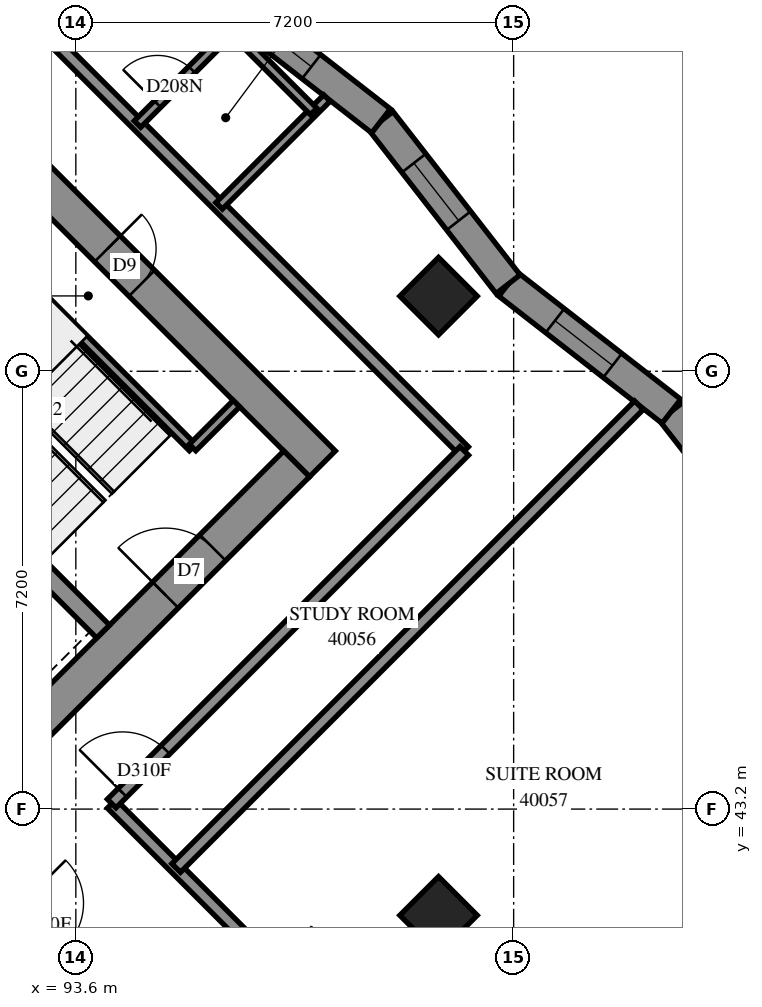
"""IFC4 building model, lengths in metres.
Left out: names, types, materials, properties, quantities, classifications, styles, units other than length and angle.
Written with IfcOpenShell. Run it as: python <this file> out.ifc"""

import sys

from ifc_helpers import new_model, si_unit, direction, frame, frame_2d, origin, origin_2d, place, context, subcontext, project, spatial, polyline, rectangle, outline, extrude, element, fill, save


model = new_model("IFC4")
c1 = context("Model", 3, precision=1e-05, world=origin(), true_north=direction((0.0, 1.0)))
c2 = subcontext(c1, "Body", "Model", "MODEL_VIEW")
j1 = project(units=[si_unit("LENGTHUNIT", "METRE"), si_unit("PLANEANGLEUNIT", "RADIAN")], contexts=[c1])
p1 = place(None, origin())
s1 = spatial("IfcSite", under=j1, at=p1, CompositionType="ELEMENT")
p2 = place(p1, origin())
s2 = spatial("IfcBuilding", under=s1, at=p2, CompositionType="ELEMENT")
p3 = place(p2, frame((0.0, 0.0, 149.0)))
s3 = spatial("IfcBuildingStorey", under=s2, at=p3, CompositionType="ELEMENT", Elevation=149.0)
for number, where, z_axis, x_axis in (
    (1, (99.565, 51.635, 0.0), (0.0, 0.0, 1.0), (0.707, -0.707, 0.0)),
    (2, (99.565, 41.453, 0.0), (0.0, 0.0, 1.0), (0.707, -0.707, 0.0)),
):
    element("IfcColumn", number, at=place(p3, frame(where, z_axis=z_axis, x_axis=x_axis)), inside=s3, PredefinedType="COLUMN", context=c2, shape_type="SweptSolid", body=[
        extrude(rectangle(XDim=0.9, YDim=0.9, at=origin_2d()), origin(), (0.0, 0.0, 1.0), 3.1),
    ])
p4 = place(p3, frame((86.625, 59.908, -0.3), z_axis=(0.0, 0.0, 1.0), x_axis=(0.7071067812, -0.7071067812, 0.0)))
e3 = element("IfcWall", 3, at=p4, inside=s3, PredefinedType="SHEAR", context=c2, shape_type="SweptSolid", body=[
    extrude(rectangle(XDim=15.6, YDim=0.6, at=frame_2d((7.8, 0.0))), origin(), (0.0, 0.0, 1.0), 2.7),
])
p5 = place(p4, frame((10.6, 0.0, 0.3)))
e4 = element("IfcOpeningElement", 4, at=p5, cuts=e3, PredefinedType="OPENING", context=c2, shape_type="SweptSolid", body=[
    extrude(rectangle(XDim=0.8, YDim=2.1, at=frame_2d((0.4, 1.05))), frame((0.0, 0.31, 0.0), z_axis=(0.0, -1.0, 0.0), x_axis=(1.0, 0.0, 0.0)), (0.0, 0.0, 1.0), 0.62),
])
p6 = place(p3, frame((87.049, 38.695, -0.3), z_axis=(0.0, 0.0, 1.0), x_axis=(0.7071067812, 0.7071067812, 0.0)))
e5 = element("IfcWall", 5, at=p6, inside=s3, PredefinedType="SHEAR", context=c2, shape_type="SweptSolid", body=[
    extrude(rectangle(XDim=14.4, YDim=0.6, at=frame_2d((7.2, 0.0))), origin(), (0.0, 0.0, 1.0), 2.7),
])
p7 = place(p6, frame((4.55, 0.0, 0.3)))
e6 = element("IfcOpeningElement", 6, at=p7, cuts=e5, PredefinedType="OPENING", context=c2, shape_type="SweptSolid", body=[
    extrude(rectangle(XDim=1.1, YDim=2.1, at=frame_2d((0.55, 1.05))), frame((0.0, 0.31, 0.0), z_axis=(0.0, -1.0, 0.0), x_axis=(1.0, 0.0, 0.0)), (0.0, 0.0, 1.0), 0.62),
])
p8 = place(p6, frame((11.35, 0.0, 0.3)))
e7 = element("IfcOpeningElement", 7, at=p8, cuts=e5, PredefinedType="OPENING", context=c2, shape_type="SweptSolid", body=[
    extrude(rectangle(XDim=1.1, YDim=2.1, at=frame_2d((0.55, 1.05))), frame((0.0, 0.31, 0.0), z_axis=(0.0, -1.0, 0.0), x_axis=(1.0, 0.0, 0.0)), (0.0, 0.0, 1.0), 0.62),
])
p9 = place(p3, frame((88.958, 51.211, 0.0), z_axis=(0.0, 0.0, 1.0), x_axis=(0.7070998367, -0.7071137256, 0.0)))
e8 = element("IfcWall", 8, at=p9, inside=s3, PredefinedType="SOLIDWALL", context=c2, shape_type="SweptSolid", body=[
    extrude(rectangle(XDim=7.2, YDim=0.3, at=frame_2d((3.6, 0.0))), origin(), (0.0, 0.0, 1.0), 3.1),
])
p10 = place(p3, frame((105.498, 47.039, 0.0), z_axis=(0.0, 0.0, 1.0), x_axis=(-0.6141912527, 0.7891572119, 0.0)))
e9 = element("IfcWall", 9, at=p10, inside=s3, PredefinedType="SOLIDWALL", context=c2, shape_type="SweptSolid", body=[
    extrude(outline(polyline([(0.053, -0.25), (3.456, -0.25), (3.393, 0.25), (-0.053, 0.25), (0.053, -0.25)])), origin(), (0.0, 0.0, 1.0), 3.1),
])
p11 = place(p10, frame((1.097, 0.0, 0.45)))
e10 = element("IfcOpeningElement", 10, at=p11, cuts=e9, PredefinedType="OPENING", context=c2, shape_type="SweptSolid", body=[
    extrude(rectangle(XDim=1.2, YDim=2.5, at=frame_2d((0.6, 1.25))), frame((0.0, 0.26, 0.0), z_axis=(0.0, -1.0, 0.0), x_axis=(1.0, 0.0, 0.0)), (0.0, 0.0, 1.0), 0.52),
])
p12 = place(p3, frame((103.394, 49.742, 0.0), z_axis=(0.0, 0.0, 1.0), x_axis=(-0.7891622864, 0.6141847326, 0.0)))
e11 = element("IfcWall", 11, at=p12, inside=s3, PredefinedType="SOLIDWALL", context=c2, shape_type="SweptSolid", body=[
    extrude(outline(polyline([(-0.031, -0.25), (3.372, -0.25), (3.434, 0.25), (0.031, 0.25), (-0.031, -0.25)])), origin(), (0.0, 0.0, 1.0), 3.1),
])
p13 = place(p12, frame((1.226, 0.0, 0.45)))
e12 = element("IfcOpeningElement", 12, at=p13, cuts=e11, PredefinedType="OPENING", context=c2, shape_type="SweptSolid", body=[
    extrude(rectangle(XDim=1.2, YDim=2.5, at=frame_2d((0.6, 1.25))), frame((0.0, 0.26, 0.0), z_axis=(0.0, -1.0, 0.0), x_axis=(1.0, 0.0, 0.0)), (0.0, 0.0, 1.0), 0.52),
])
p14 = place(p3, frame((100.709, 51.832, 0.0), z_axis=(0.0, 0.0, 1.0), x_axis=(-0.6141887905, 0.7891591282, 0.0)))
e13 = element("IfcWall", 13, at=p14, inside=s3, PredefinedType="SOLIDWALL", context=c2, shape_type="SweptSolid", body=[
    extrude(outline(polyline([(0.031, -0.25), (3.434, -0.25), (3.372, 0.25), (-0.031, 0.25), (0.031, -0.25)])), origin(), (0.0, 0.0, 1.0), 3.1),
])
p15 = place(p14, frame((1.323, 0.0, 0.45)))
e14 = element("IfcOpeningElement", 14, at=p15, cuts=e13, PredefinedType="OPENING", context=c2, shape_type="SweptSolid", body=[
    extrude(rectangle(XDim=1.2, YDim=2.5, at=frame_2d((0.6, 1.25))), frame((0.0, 0.26, 0.0), z_axis=(0.0, -1.0, 0.0), x_axis=(1.0, 0.0, 0.0)), (0.0, 0.0, 1.0), 0.52),
])
p16 = place(p3, frame((98.619, 54.517, 0.0), z_axis=(0.0, 0.0, 1.0), x_axis=(-0.7891480422, 0.6142030344, 0.0)))
e15 = element("IfcWall", 15, at=p16, inside=s3, PredefinedType="SOLIDWALL", context=c2, shape_type="SweptSolid", body=[
    extrude(outline(polyline([(-0.031, -0.25), (3.372, -0.25), (3.434, 0.25), (0.031, 0.25), (-0.031, -0.25)])), origin(), (0.0, 0.0, 1.0), 3.1),
])
p17 = place(p16, frame((1.452, 0.0, 0.45)))
e16 = element("IfcOpeningElement", 16, at=p17, cuts=e15, PredefinedType="OPENING", context=c2, shape_type="SweptSolid", body=[
    extrude(rectangle(XDim=1.2, YDim=2.5, at=frame_2d((0.6, 1.25))), frame((0.0, 0.26, 0.0), z_axis=(0.0, -1.0, 0.0), x_axis=(1.0, 0.0, 0.0)), (0.0, 0.0, 1.0), 0.52),
])
p18 = place(p3, frame((91.313, 53.354, 0.0), z_axis=(0.0, 0.0, 1.0), x_axis=(0.7071067812, -0.7071067812, 0.0)))
e17 = element("IfcWall", 17, at=p18, inside=s3, PredefinedType="PARTITIONING", context=c2, shape_type="SweptSolid", body=[
    extrude(rectangle(XDim=5.95, YDim=0.15, at=frame_2d((2.975, 0.0))), origin(), (0.0, 0.0, 1.0), 3.1),
])
p19 = place(p3, frame((95.52, 49.146, 0.0), z_axis=(0.0, 0.0, 1.0), x_axis=(0.7071067812, 0.7071067812, 0.0)))
e18 = element("IfcWall", 18, at=p19, inside=s3, PredefinedType="PARTITIONING", context=c2, shape_type="SweptSolid", body=[
    extrude(rectangle(XDim=1.02, YDim=0.15, at=frame_2d((0.51, 0.0))), origin(), (0.0, 0.0, 1.0), 3.1),
])
p20 = place(p3, frame((94.189, 43.287, 0.0), z_axis=(0.0, 0.0, 1.0), x_axis=(0.7071067812, -0.7071067812, 0.0)))
e19 = element("IfcWall", 19, at=p20, inside=s3, PredefinedType="PARTITIONING", context=c2, shape_type="SweptSolid", body=[
    extrude(rectangle(XDim=12.298, YDim=0.2, at=frame_2d((6.149, 0.0))), origin(), (0.0, 0.0, 1.0), 3.1),
])
p21 = place(p20, frame((3.755, 0.0, 0.0)))
e20 = element("IfcOpeningElement", 20, at=p21, cuts=e19, PredefinedType="OPENING", context=c2, shape_type="SweptSolid", body=[
    extrude(rectangle(XDim=0.9, YDim=2.1, at=frame_2d((0.45, 1.05))), frame((0.0, 0.11, 0.0), z_axis=(0.0, -1.0, 0.0), x_axis=(1.0, 0.0, 0.0)), (0.0, 0.0, 1.0), 0.22),
])
p22 = place(p20, frame((10.998, 0.0, 0.0)))
e21 = element("IfcOpeningElement", 21, at=p22, cuts=e19, PredefinedType="OPENING", context=c2, shape_type="SweptSolid", body=[
    extrude(rectangle(XDim=0.9, YDim=2.1, at=frame_2d((0.45, 1.05))), frame((0.0, 0.11, 0.0), z_axis=(0.0, -1.0, 0.0), x_axis=(1.0, 0.0, 0.0)), (0.0, 0.0, 1.0), 0.22),
])
p23 = place(p3, frame((91.755, 57.317, 0.0), z_axis=(0.0, 0.0, 1.0), x_axis=(0.7071067812, -0.7071067812, 0.0)))
e22 = element("IfcWall", 22, at=p23, inside=s3, PredefinedType="PARTITIONING", context=c2, shape_type="SweptSolid", body=[
    extrude(rectangle(XDim=11.639, YDim=0.2, at=frame_2d((5.819, 0.0))), origin(), (0.0, 0.0, 1.0), 3.1),
])
p24 = place(p3, frame((95.25, 42.232, 0.0), z_axis=(0.0, 0.0, 1.0), x_axis=(0.7071114274, 0.7071021349, 0.0)))
e23 = element("IfcWall", 23, at=p24, inside=s3, PredefinedType="PARTITIONING", context=c2, shape_type="SweptSolid", body=[
    extrude(rectangle(XDim=10.761, YDim=0.2, at=frame_2d((5.381, 0.0))), origin(), (0.0, 0.0, 1.0), 3.1),
])
p25 = place(p3, frame((94.19, 43.292, 0.0), z_axis=(0.0, 0.0, 1.0), x_axis=(0.7071067812, 0.7071067812, 0.0)))
e24 = element("IfcWall", 24, at=p25, inside=s3, PredefinedType="PARTITIONING", context=c2, shape_type="SweptSolid", body=[
    extrude(rectangle(XDim=8.2, YDim=0.2, at=frame_2d((4.1, 0.0))), origin(), (0.0, 0.0, 1.0), 3.1),
])
p26 = place(p25, frame((0.251, 0.0, 0.0)))
e25 = element("IfcOpeningElement", 25, at=p26, cuts=e24, PredefinedType="OPENING", context=c2, shape_type="SweptSolid", body=[
    extrude(rectangle(XDim=1.0, YDim=2.1, at=frame_2d((0.5, 1.05))), frame((0.0, 0.11, 0.0), z_axis=(0.0, -1.0, 0.0), x_axis=(1.0, 0.0, 0.0)), (0.0, 0.0, 1.0), 0.22),
])
p27 = place(p3, frame((92.639, 41.739, 0.0), z_axis=(0.0, 0.0, 1.0), x_axis=(0.7071067812, -0.7071067812, 0.0)))
e26 = element("IfcWall", 26, at=p27, inside=s3, PredefinedType="PARTITIONING", context=c2, shape_type="SweptSolid", body=[
    extrude(rectangle(XDim=5.1, YDim=0.2, at=frame_2d((2.55, 0.0))), origin(), (0.0, 0.0, 1.0), 3.1),
])
p28 = place(p27, frame((0.123, 0.0, 0.0)))
e27 = element("IfcOpeningElement", 27, at=p28, cuts=e26, PredefinedType="OPENING", context=c2, shape_type="SweptSolid", body=[
    extrude(rectangle(XDim=1.0, YDim=2.1, at=frame_2d((0.5, 1.05))), frame((0.0, 0.11, 0.0), z_axis=(0.0, -1.0, 0.0), x_axis=(1.0, 0.0, 0.0)), (0.0, 0.0, 1.0), 0.22),
])
p29 = place(p27, frame((3.734, 0.0, 0.0)))
e28 = element("IfcOpeningElement", 28, at=p29, cuts=e26, PredefinedType="OPENING", context=c2, shape_type="SweptSolid", body=[
    extrude(rectangle(XDim=0.9, YDim=2.1, at=frame_2d((0.45, 1.05))), frame((0.0, 0.11, 0.0), z_axis=(0.0, -1.0, 0.0), x_axis=(1.0, 0.0, 0.0)), (0.0, 0.0, 1.0), 0.22),
])
p30 = place(p3, frame((95.957, 53.121, 0.0), z_axis=(0.0, 0.0, 1.0), x_axis=(0.7071067812, 0.7071067812, 0.0)))
e29 = element("IfcWall", 29, at=p30, inside=s3, PredefinedType="PARTITIONING", context=c2, shape_type="SweptSolid", body=[
    extrude(rectangle(XDim=2.506, YDim=0.15, at=frame_2d((1.253, 0.0))), origin(), (0.0, 0.0, 1.0), 3.1),
])
p31 = place(p3, frame((94.614, 54.464, 0.0), z_axis=(0.0, 0.0, 1.0), x_axis=(0.7070847464, 0.7071288153, 0.0)))
e30 = element("IfcWall", 30, at=p31, inside=s3, PredefinedType="PARTITIONING", context=c2, shape_type="SweptSolid", body=[
    extrude(rectangle(XDim=2.269, YDim=0.15, at=frame_2d((1.135, 0.0))), origin(), (0.0, 0.0, 1.0), 3.1),
])
p32 = place(p31, frame((0.466, 0.0, 0.0)))
e31 = element("IfcOpeningElement", 31, at=p32, cuts=e30, PredefinedType="OPENING", context=c2, shape_type="SweptSolid", body=[
    extrude(rectangle(XDim=0.8, YDim=2.1, at=frame_2d((0.4, 1.05))), frame((0.0, 0.085, 0.0), z_axis=(0.0, -1.0, 0.0), x_axis=(1.0, 0.0, 0.0)), (0.0, 0.0, 1.0), 0.17),
])
p33 = place(p3, frame((96.235, 55.949, 0.0), z_axis=(0.0, 0.0, 1.0), x_axis=(0.7071067812, -0.7071067812, 0.0)))
e32 = element("IfcWall", 32, at=p33, inside=s3, PredefinedType="PARTITIONING", context=c2, shape_type="SweptSolid", body=[
    extrude(rectangle(XDim=1.804, YDim=0.15, at=frame_2d((0.902, 0.0))), origin(), (0.0, 0.0, 1.0), 3.1),
])
p34 = place(p13, origin())
e33 = element("IfcWindow", 33, at=p34, inside=s3, PartitioningType="SINGLE_PANEL", PredefinedType="WINDOW", context=c2, shape_type="SweptSolid", body=[
    extrude(rectangle(XDim=1.2, YDim=2.5, at=frame_2d((0.6, 1.25))), frame((0.0, 0.18, 0.0), z_axis=(0.0, -1.0, 0.0), x_axis=(1.0, 0.0, 0.0)), (0.0, 0.0, 1.0), 0.06),
])
fill(e12, e33)
p35 = place(p15, origin())
e34 = element("IfcWindow", 34, at=p35, inside=s3, PartitioningType="SINGLE_PANEL", PredefinedType="WINDOW", context=c2, shape_type="SweptSolid", body=[
    extrude(rectangle(XDim=1.2, YDim=2.5, at=frame_2d((0.6, 1.25))), frame((0.0, 0.18, 0.0), z_axis=(0.0, -1.0, 0.0), x_axis=(1.0, 0.0, 0.0)), (0.0, 0.0, 1.0), 0.06),
])
fill(e14, e34)
p36 = place(p17, origin())
e35 = element("IfcWindow", 35, at=p36, inside=s3, PartitioningType="SINGLE_PANEL", PredefinedType="WINDOW", context=c2, shape_type="SweptSolid", body=[
    extrude(rectangle(XDim=1.2, YDim=2.5, at=frame_2d((0.6, 1.25))), frame((0.0, 0.18, 0.0), z_axis=(0.0, -1.0, 0.0), x_axis=(1.0, 0.0, 0.0)), (0.0, 0.0, 1.0), 0.06),
])
fill(e16, e35)
p37 = place(p5, origin())
e36 = element("IfcDoor", 36, at=p37, inside=s3, OperationType="SINGLE_SWING_RIGHT", PredefinedType="DOOR", context=c2, shape_type="SweptSolid", body=[
    extrude(rectangle(XDim=0.8, YDim=2.1, at=frame_2d((0.4, 1.05))), frame((0.0, 0.025, 0.0), z_axis=(0.0, -1.0, 0.0), x_axis=(1.0, 0.0, 0.0)), (0.0, 0.0, 1.0), 0.05),
])
fill(e4, e36)
p38 = place(p8, origin())
e37 = element("IfcDoor", 37, at=p38, inside=s3, OperationType="SINGLE_SWING_RIGHT", PredefinedType="DOOR", context=c2, shape_type="SweptSolid", body=[
    extrude(rectangle(XDim=1.1, YDim=2.1, at=frame_2d((0.55, 1.05))), frame((0.0, 0.025, 0.0), z_axis=(0.0, -1.0, 0.0), x_axis=(1.0, 0.0, 0.0)), (0.0, 0.0, 1.0), 0.05),
])
fill(e7, e37)
p39 = place(p26, origin())
e38 = element("IfcDoor", 38, at=p39, inside=s3, OperationType="SINGLE_SWING_RIGHT", PredefinedType="DOOR", context=c2, shape_type="SweptSolid", body=[
    extrude(rectangle(XDim=1.0, YDim=2.1, at=frame_2d((0.5, 1.05))), frame((0.0, 0.025, 0.0), z_axis=(0.0, -1.0, 0.0), x_axis=(1.0, 0.0, 0.0)), (0.0, 0.0, 1.0), 0.05),
])
fill(e25, e38)
p40 = place(p32, origin())
e39 = element("IfcDoor", 39, at=p40, inside=s3, OperationType="SINGLE_SWING_RIGHT", PredefinedType="DOOR", context=c2, shape_type="SweptSolid", body=[
    extrude(rectangle(XDim=0.8, YDim=2.1, at=frame_2d((0.4, 1.05))), frame((0.0, 0.025, 0.0), z_axis=(0.0, -1.0, 0.0), x_axis=(1.0, 0.0, 0.0)), (0.0, 0.0, 1.0), 0.05),
])
fill(e31, e39)
p41 = place(p28, origin())
e40 = element("IfcDoor", 40, at=p41, inside=s3, OperationType="SINGLE_SWING_RIGHT", PredefinedType="DOOR", context=c2, shape_type="SweptSolid", body=[
    extrude(rectangle(XDim=1.0, YDim=2.1, at=frame_2d((0.5, 1.05))), frame((0.0, 0.025, 0.0), z_axis=(0.0, -1.0, 0.0), x_axis=(1.0, 0.0, 0.0)), (0.0, 0.0, 1.0), 0.05),
])
fill(e27, e40)
save(model, sys.argv[1])
